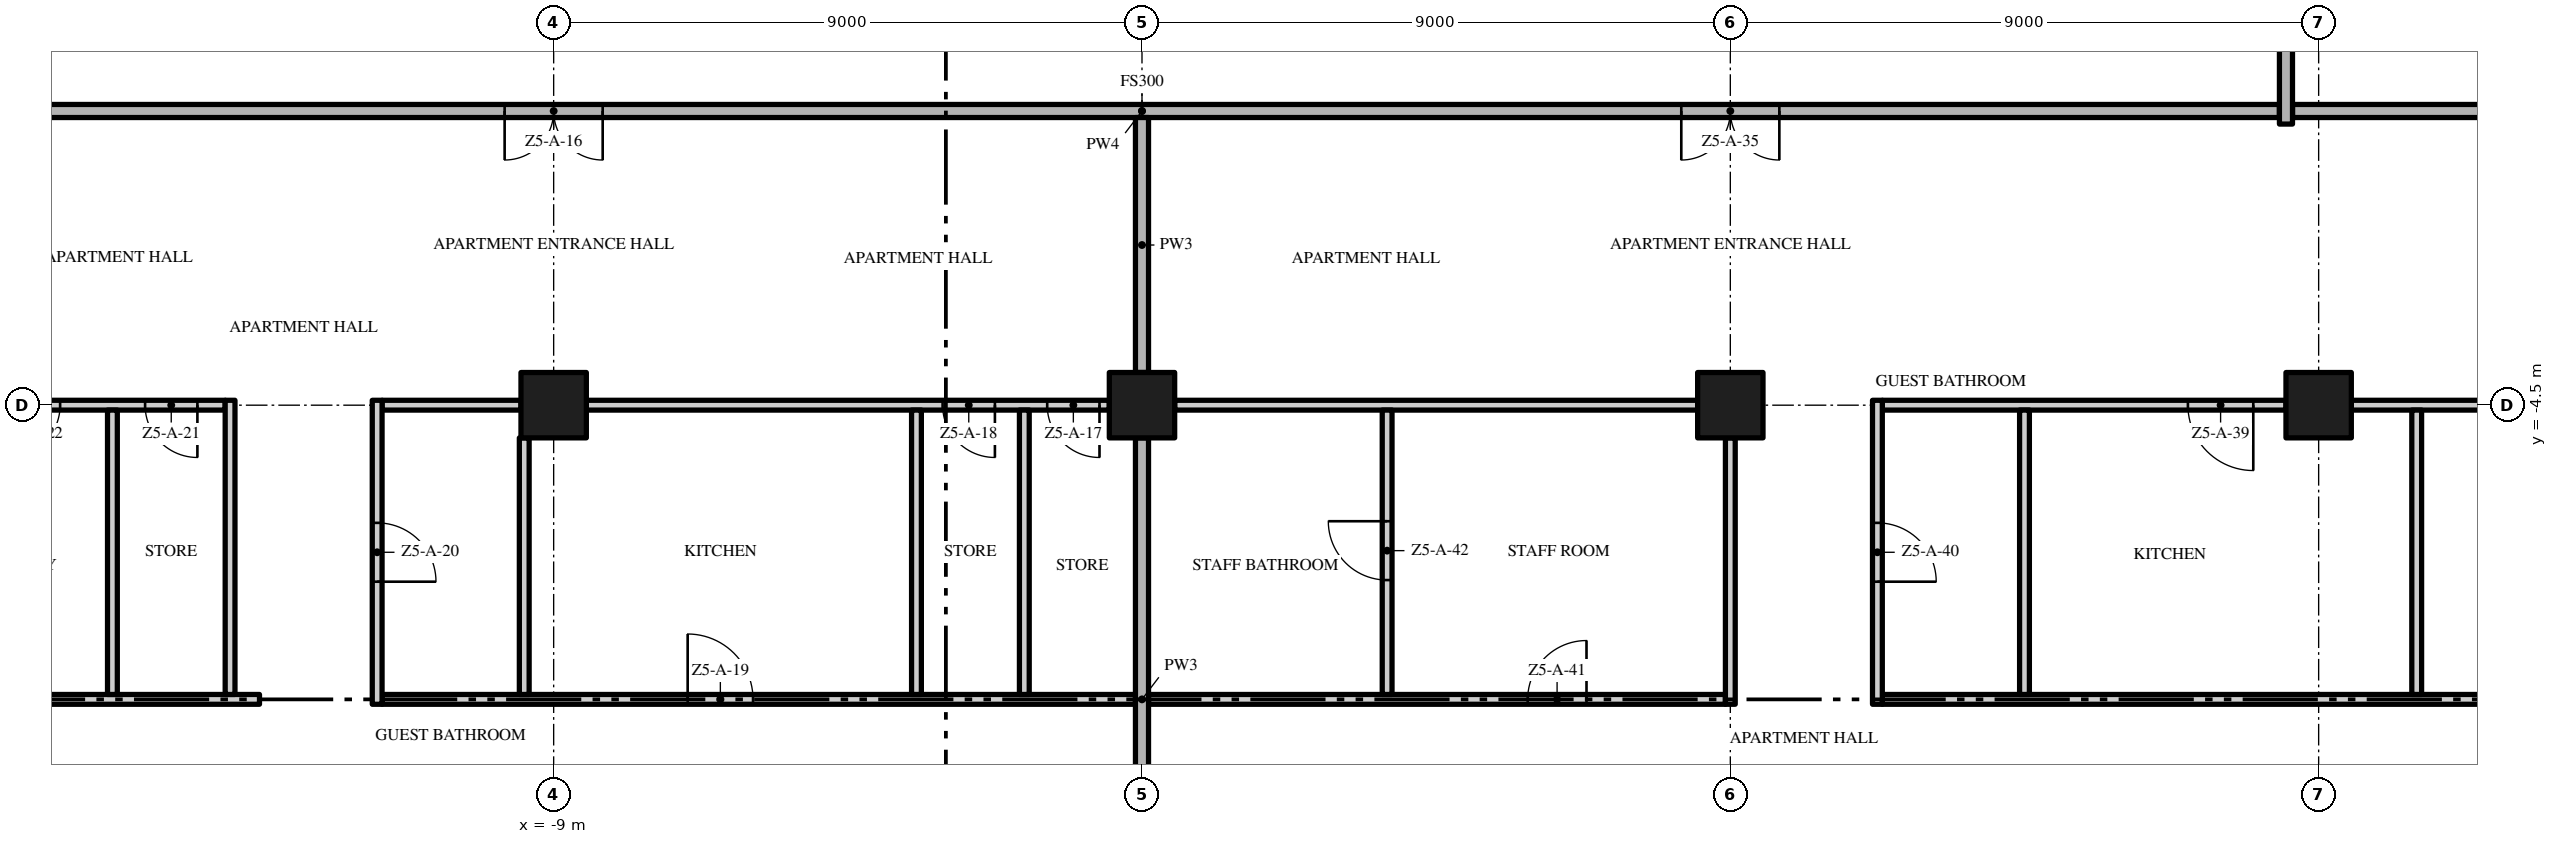
"""IFC4 building model, lengths in metres.
Left out: names, types, materials, properties, quantities, classifications, styles, units other than length and angle.
Written with IfcOpenShell. Run it as: python <this file> out.ifc"""

import sys

from ifc_helpers import new_model, si_unit, direction, frame, frame_2d, origin, origin_2d, place, context, subcontext, project, spatial, rectangle, extrude, element, fill, save


model = new_model("IFC4")
c1 = context("Model", 3, precision=1e-05, world=origin(), true_north=direction((0.0, 1.0)))
c2 = subcontext(c1, "Body", "Model", "MODEL_VIEW")
j1 = project(units=[si_unit("LENGTHUNIT", "METRE"), si_unit("PLANEANGLEUNIT", "RADIAN")], contexts=[c1])
p1 = place(None, origin())
s1 = spatial("IfcSite", under=j1, at=p1, CompositionType="ELEMENT")
p2 = place(p1, origin())
s2 = spatial("IfcBuilding", under=s1, at=p2, CompositionType="ELEMENT")
p3 = place(p2, frame((0.0, 0.0, 238.8)))
s3 = spatial("IfcBuildingStorey", under=s2, at=p3, CompositionType="ELEMENT", Elevation=238.8)
for number, where, z_axis, x_axis in (
    (1, (-9.0, -4.5, 0.0), (0.0, 0.0, 1.0), (1.0, 0.0, 0.0)),
    (2, (0.0, -4.5, 0.0), (0.0, 0.0, 1.0), (1.0, 0.0, 0.0)),
    (3, (18.0, -4.5, 0.0), (0.0, 0.0, 1.0), (1.0, 0.0, 0.0)),
    (4, (9.0, -4.5, 0.0), (0.0, 0.0, 1.0), (1.0, 0.0, 0.0)),
):
    element("IfcColumn", number, at=place(p3, frame(where, z_axis=z_axis, x_axis=x_axis)), inside=s3, PredefinedType="COLUMN", context=c2, shape_type="SweptSolid", body=[
        extrude(rectangle(XDim=1.0, YDim=1.0, at=origin_2d()), origin(), (0.0, 0.0, 1.0), 3.5),
    ])
p4 = place(p3, frame((-26.7, -9.0, 0.0), z_axis=(0.0, 0.0, 1.0), x_axis=(1.0, 0.0, 0.0)))
e5 = element("IfcWall", 5, at=p4, inside=s3, PredefinedType="PARTITIONING", context=c2, shape_type="SweptSolid", body=[
    extrude(rectangle(XDim=13.2, YDim=0.15, at=frame_2d((6.6, 0.0))), origin(), (0.0, 0.0, 1.0), 3.5),
])
p5 = place(p3, frame((-11.625, -9.0, 0.0), z_axis=(0.0, 0.0, 1.0), x_axis=(1.0, 0.0, 0.0)))
e6 = element("IfcWall", 6, at=p5, inside=s3, PredefinedType="PARTITIONING", context=c2, shape_type="SweptSolid", body=[
    extrude(rectangle(XDim=11.525, YDim=0.15, at=frame_2d((5.763, 0.0))), origin(), (0.0, 0.0, 1.0), 3.5),
])
p6 = place(p5, frame((4.675, 0.0, 0.0)))
e7 = element("IfcOpeningElement", 7, at=p6, cuts=e6, PredefinedType="OPENING", context=c2, shape_type="SweptSolid", body=[
    extrude(rectangle(XDim=1.0, YDim=2.4, at=frame_2d((0.5, 1.2))), frame((0.0, 0.085, 0.0), z_axis=(0.0, -1.0, 0.0), x_axis=(1.0, 0.0, 0.0)), (0.0, 0.0, 1.0), 0.17),
])
p7 = place(p3, frame((0.1, -9.0, 0.0), z_axis=(0.0, 0.0, 1.0), x_axis=(1.0, 0.0, 0.0)))
e8 = element("IfcWall", 8, at=p7, inside=s3, PredefinedType="PARTITIONING", context=c2, shape_type="SweptSolid", body=[
    extrude(rectangle(XDim=8.825, YDim=0.15, at=frame_2d((4.412, 0.0))), origin(), (0.0, 0.0, 1.0), 3.5),
])
p8 = place(p7, frame((5.8, 0.0, 0.0)))
e9 = element("IfcOpeningElement", 9, at=p8, cuts=e8, PredefinedType="OPENING", context=c2, shape_type="SweptSolid", body=[
    extrude(rectangle(XDim=0.9, YDim=2.1, at=frame_2d((0.45, 1.05))), frame((0.0, 0.085, 0.0), z_axis=(0.0, -1.0, 0.0), x_axis=(1.0, 0.0, 0.0)), (0.0, 0.0, 1.0), 0.17),
])
p9 = place(p3, frame((11.325, -9.0, 0.0), z_axis=(0.0, 0.0, 1.0), x_axis=(1.0, 0.0, 0.0)))
e10 = element("IfcWall", 10, at=p9, inside=s3, PredefinedType="PARTITIONING", context=c2, shape_type="SweptSolid", body=[
    extrude(rectangle(XDim=15.375, YDim=0.15, at=frame_2d((7.688, 0.0))), origin(), (0.0, 0.0, 1.0), 3.5),
])
p10 = place(p9, frame((14.375, 0.0, 0.0)))
e11 = element("IfcOpeningElement", 11, at=p10, cuts=e10, PredefinedType="OPENING", context=c2, shape_type="SweptSolid", body=[
    extrude(rectangle(XDim=0.8, YDim=2.0, at=frame_2d((0.4, 1.0))), frame((0.0, 0.085, 0.0), z_axis=(0.0, -1.0, 0.0), x_axis=(1.0, 0.0, 0.0)), (0.0, 0.0, 1.0), 0.17),
])
p11 = place(p3, frame((-14.025, -4.5, 0.0), z_axis=(0.0, 0.0, 1.0), x_axis=(-1.0, 0.0, 0.0)))
e12 = element("IfcWall", 12, at=p11, inside=s3, PredefinedType="PARTITIONING", context=c2, shape_type="SweptSolid", body=[
    extrude(rectangle(XDim=3.475, YDim=0.15, at=frame_2d((1.738, 0.0))), origin(), (0.0, 0.0, 1.0), 3.5),
])
p12 = place(p11, frame((0.425, 0.0, 0.0)))
e13 = element("IfcOpeningElement", 13, at=p12, cuts=e12, PredefinedType="OPENING", context=c2, shape_type="SweptSolid", body=[
    extrude(rectangle(XDim=0.8, YDim=2.0, at=frame_2d((0.4, 1.0))), frame((0.0, 0.085, 0.0), z_axis=(0.0, -1.0, 0.0), x_axis=(1.0, 0.0, 0.0)), (0.0, 0.0, 1.0), 0.17),
])
p13 = place(p11, frame((2.525, 0.0, 0.0)))
e14 = element("IfcOpeningElement", 14, at=p13, cuts=e12, PredefinedType="OPENING", context=c2, shape_type="SweptSolid", body=[
    extrude(rectangle(XDim=0.8, YDim=2.0, at=frame_2d((0.4, 1.0))), frame((0.0, 0.085, 0.0), z_axis=(0.0, -1.0, 0.0), x_axis=(1.0, 0.0, 0.0)), (0.0, 0.0, 1.0), 0.17),
])
p14 = place(p3, frame((-11.625, -4.5, 0.0), z_axis=(0.0, 0.0, 1.0), x_axis=(1.0, 0.0, 0.0)))
e15 = element("IfcWall", 15, at=p14, inside=s3, PredefinedType="PARTITIONING", context=c2, shape_type="SweptSolid", body=[
    extrude(rectangle(XDim=2.125, YDim=0.15, at=frame_2d((1.062, 0.0))), origin(), (0.0, 0.0, 1.0), 3.5),
])
p15 = place(p3, frame((-0.5, -4.5, 0.0), z_axis=(0.0, 0.0, 1.0), x_axis=(-1.0, 0.0, 0.0)))
e16 = element("IfcWall", 16, at=p15, inside=s3, PredefinedType="PARTITIONING", context=c2, shape_type="SweptSolid", body=[
    extrude(rectangle(XDim=8.0, YDim=0.15, at=frame_2d((4.0, 0.0))), origin(), (0.0, 0.0, 1.0), 3.5),
])
p16 = place(p15, frame((0.15, 0.0, 0.0)))
e17 = element("IfcOpeningElement", 17, at=p16, cuts=e16, PredefinedType="OPENING", context=c2, shape_type="SweptSolid", body=[
    extrude(rectangle(XDim=0.8, YDim=2.0, at=frame_2d((0.4, 1.0))), frame((0.0, 0.085, 0.0), z_axis=(0.0, -1.0, 0.0), x_axis=(1.0, 0.0, 0.0)), (0.0, 0.0, 1.0), 0.17),
])
p17 = place(p15, frame((1.75, 0.0, 0.0)))
e18 = element("IfcOpeningElement", 18, at=p17, cuts=e16, PredefinedType="OPENING", context=c2, shape_type="SweptSolid", body=[
    extrude(rectangle(XDim=0.8, YDim=2.0, at=frame_2d((0.4, 1.0))), frame((0.0, 0.085, 0.0), z_axis=(0.0, -1.0, 0.0), x_axis=(1.0, 0.0, 0.0)), (0.0, 0.0, 1.0), 0.17),
])
p18 = place(p3, frame((0.5, -4.5, 0.0), z_axis=(0.0, 0.0, 1.0), x_axis=(1.0, 0.0, 0.0)))
e19 = element("IfcWall", 19, at=p18, inside=s3, PredefinedType="PARTITIONING", context=c2, shape_type="SweptSolid", body=[
    extrude(rectangle(XDim=8.0, YDim=0.15, at=frame_2d((4.0, 0.0))), origin(), (0.0, 0.0, 1.0), 3.5),
])
p19 = place(p3, frame((17.5, -4.5, 0.0), z_axis=(0.0, 0.0, 1.0), x_axis=(-1.0, 0.0, 0.0)))
e20 = element("IfcWall", 20, at=p19, inside=s3, PredefinedType="PARTITIONING", context=c2, shape_type="SweptSolid", body=[
    extrude(rectangle(XDim=6.175, YDim=0.15, at=frame_2d((3.087, 0.0))), origin(), (0.0, 0.0, 1.0), 3.5),
])
p20 = place(p19, frame((0.5, 0.0, 0.0)))
e21 = element("IfcOpeningElement", 21, at=p20, cuts=e20, PredefinedType="OPENING", context=c2, shape_type="SweptSolid", body=[
    extrude(rectangle(XDim=1.0, YDim=2.4, at=frame_2d((0.5, 1.2))), frame((0.0, 0.085, 0.0), z_axis=(0.0, -1.0, 0.0), x_axis=(1.0, 0.0, 0.0)), (0.0, 0.0, 1.0), 0.17),
])
p21 = place(p3, frame((26.1, -4.5, 0.0), z_axis=(0.0, 0.0, 1.0), x_axis=(-1.0, 0.0, 0.0)))
e22 = element("IfcWall", 22, at=p21, inside=s3, PredefinedType="PARTITIONING", context=c2, shape_type="SweptSolid", body=[
    extrude(rectangle(XDim=7.6, YDim=0.15, at=frame_2d((3.8, 0.0))), origin(), (0.0, 0.0, 1.0), 3.5),
])
p22 = place(p21, frame((1.85, 0.0, 0.0)))
e23 = element("IfcOpeningElement", 23, at=p22, cuts=e22, PredefinedType="OPENING", context=c2, shape_type="SweptSolid", body=[
    extrude(rectangle(XDim=0.8, YDim=2.0, at=frame_2d((0.4, 1.0))), frame((0.0, 0.085, 0.0), z_axis=(0.0, -1.0, 0.0), x_axis=(1.0, 0.0, 0.0)), (0.0, 0.0, 1.0), 0.17),
])
p23 = place(p21, frame((4.7, 0.0, 0.0)))
e24 = element("IfcOpeningElement", 24, at=p23, cuts=e22, PredefinedType="OPENING", context=c2, shape_type="SweptSolid", body=[
    extrude(rectangle(XDim=0.8, YDim=2.0, at=frame_2d((0.4, 1.0))), frame((0.0, 0.085, 0.0), z_axis=(0.0, -1.0, 0.0), x_axis=(1.0, 0.0, 0.0)), (0.0, 0.0, 1.0), 0.17),
])
p24 = place(p3, frame((17.4, 0.0, 0.0), z_axis=(0.0, 0.0, 1.0), x_axis=(-1.0, 0.0, 0.0)))
e25 = element("IfcWall", 25, at=p24, inside=s3, PredefinedType="PARTITIONING", context=c2, shape_type="SweptSolid", body=[
    extrude(rectangle(XDim=34.8, YDim=0.2, at=frame_2d((17.4, 0.0))), origin(), (0.0, 0.0, 1.0), 3.5),
])
p25 = place(p24, frame((25.65, 0.0, 0.0)))
e26 = element("IfcOpeningElement", 26, at=p25, cuts=e25, PredefinedType="OPENING", context=c2, shape_type="SweptSolid", body=[
    extrude(rectangle(XDim=1.5, YDim=2.4, at=frame_2d((0.75, 1.2))), frame((0.0, 0.11, 0.0), z_axis=(0.0, -1.0, 0.0), x_axis=(1.0, 0.0, 0.0)), (0.0, 0.0, 1.0), 0.22),
])
p26 = place(p24, frame((7.65, 0.0, 0.0)))
e27 = element("IfcOpeningElement", 27, at=p26, cuts=e25, PredefinedType="OPENING", context=c2, shape_type="SweptSolid", body=[
    extrude(rectangle(XDim=1.5, YDim=2.4, at=frame_2d((0.75, 1.2))), frame((0.0, 0.11, 0.0), z_axis=(0.0, -1.0, 0.0), x_axis=(1.0, 0.0, 0.0)), (0.0, 0.0, 1.0), 0.22),
])
p27 = place(p3, frame((17.6, 0.0, 0.0), z_axis=(0.0, 0.0, 1.0), x_axis=(1.0, 0.0, 0.0)))
e28 = element("IfcWall", 28, at=p27, inside=s3, PredefinedType="PARTITIONING", context=c2, shape_type="SweptSolid", body=[
    extrude(rectangle(XDim=9.1, YDim=0.2, at=frame_2d((4.55, 0.0))), origin(), (0.0, 0.0, 1.0), 3.5),
])
p28 = place(p3, frame((-15.75, -8.925, 0.0), z_axis=(0.0, 0.0, 1.0), x_axis=(0.0, 1.0, 0.0)))
e29 = element("IfcWall", 29, at=p28, inside=s3, PredefinedType="PARTITIONING", context=c2, shape_type="SweptSolid", body=[
    extrude(rectangle(XDim=4.35, YDim=0.15, at=frame_2d((2.175, 0.0))), origin(), (0.0, 0.0, 1.0), 3.5),
])
p29 = place(p3, frame((-13.95, -8.925, 0.0), z_axis=(0.0, 0.0, 1.0), x_axis=(0.0, 1.0, 0.0)))
e30 = element("IfcWall", 30, at=p29, inside=s3, PredefinedType="PARTITIONING", context=c2, shape_type="SweptSolid", body=[
    extrude(rectangle(XDim=4.5, YDim=0.15, at=frame_2d((2.25, 0.0))), origin(), (0.0, 0.0, 1.0), 3.5),
])
p30 = place(p3, frame((-11.7, -4.425, 0.0), z_axis=(0.0, 0.0, 1.0), x_axis=(0.0, -1.0, 0.0)))
e31 = element("IfcWall", 31, at=p30, inside=s3, PredefinedType="PARTITIONING", context=c2, shape_type="SweptSolid", body=[
    extrude(rectangle(XDim=4.65, YDim=0.15, at=frame_2d((2.325, 0.0))), origin(), (0.0, 0.0, 1.0), 3.5),
])
p31 = place(p30, frame((1.875, 0.0, 0.0)))
e32 = element("IfcOpeningElement", 32, at=p31, cuts=e31, PredefinedType="OPENING", context=c2, shape_type="SweptSolid", body=[
    extrude(rectangle(XDim=0.9, YDim=2.1, at=frame_2d((0.45, 1.05))), frame((0.0, 0.085, 0.0), z_axis=(0.0, -1.0, 0.0), x_axis=(1.0, 0.0, 0.0)), (0.0, 0.0, 1.0), 0.17),
])
p32 = place(p3, frame((-9.45, -8.925, 0.0), z_axis=(0.0, 0.0, 1.0), x_axis=(0.0, 1.0, 0.0)))
e33 = element("IfcWall", 33, at=p32, inside=s3, PredefinedType="PARTITIONING", context=c2, shape_type="SweptSolid", body=[
    extrude(rectangle(XDim=3.925, YDim=0.15, at=frame_2d((1.962, 0.0))), origin(), (0.0, 0.0, 1.0), 3.5),
])
for number, where, z_axis, x_axis in (
    (34, (-3.45, -8.925, 0.0), (0.0, 0.0, 1.0), (0.0, 1.0, 0.0)),
    (35, (-1.8, -8.925, 0.0), (0.0, 0.0, 1.0), (0.0, 1.0, 0.0)),
):
    element("IfcWall", number, at=place(p3, frame(where, z_axis=z_axis, x_axis=x_axis)), inside=s3, PredefinedType="PARTITIONING", context=c2, shape_type="SweptSolid", body=[
        extrude(rectangle(XDim=4.35, YDim=0.15, at=frame_2d((2.175, 0.0))), origin(), (0.0, 0.0, 1.0), 3.5),
    ])
p33 = place(p3, frame((0.0, -13.0, 0.0), z_axis=(0.0, 0.0, 1.0), x_axis=(0.0, 1.0, 0.0)))
e36 = element("IfcWall", 36, at=p33, inside=s3, PredefinedType="PARTITIONING", context=c2, shape_type="SweptSolid", body=[
    extrude(rectangle(XDim=8.0, YDim=0.2, at=frame_2d((4.0, 0.0))), origin(), (0.0, 0.0, 1.0), 3.5),
])
p34 = place(p3, frame((0.0, -4.0, 0.0), z_axis=(0.0, 0.0, 1.0), x_axis=(0.0, 1.0, 0.0)))
e37 = element("IfcWall", 37, at=p34, inside=s3, PredefinedType="PARTITIONING", context=c2, shape_type="SweptSolid", body=[
    extrude(rectangle(XDim=3.9, YDim=0.2, at=frame_2d((1.95, 0.0))), origin(), (0.0, 0.0, 1.0), 3.5),
])
p35 = place(p3, frame((3.75, -8.925, 0.0), z_axis=(0.0, 0.0, 1.0), x_axis=(0.0, 1.0, 0.0)))
e38 = element("IfcWall", 38, at=p35, inside=s3, PredefinedType="PARTITIONING", context=c2, shape_type="SweptSolid", body=[
    extrude(rectangle(XDim=4.35, YDim=0.15, at=frame_2d((2.175, 0.0))), origin(), (0.0, 0.0, 1.0), 3.5),
])
p36 = place(p35, frame((1.75, 0.0, 0.0)))
e39 = element("IfcOpeningElement", 39, at=p36, cuts=e38, PredefinedType="OPENING", context=c2, shape_type="SweptSolid", body=[
    extrude(rectangle(XDim=0.9, YDim=2.1, at=frame_2d((0.45, 1.05))), frame((0.0, 0.085, 0.0), z_axis=(0.0, -1.0, 0.0), x_axis=(1.0, 0.0, 0.0)), (0.0, 0.0, 1.0), 0.17),
])
p37 = place(p3, frame((9.0, -9.075, 0.0), z_axis=(0.0, 0.0, 1.0), x_axis=(0.0, 1.0, 0.0)))
e40 = element("IfcWall", 40, at=p37, inside=s3, PredefinedType="PARTITIONING", context=c2, shape_type="SweptSolid", body=[
    extrude(rectangle(XDim=4.075, YDim=0.15, at=frame_2d((2.038, 0.0))), origin(), (0.0, 0.0, 1.0), 3.5),
])
p38 = place(p3, frame((11.25, -4.425, 0.0), z_axis=(0.0, 0.0, 1.0), x_axis=(0.0, -1.0, 0.0)))
e41 = element("IfcWall", 41, at=p38, inside=s3, PredefinedType="PARTITIONING", context=c2, shape_type="SweptSolid", body=[
    extrude(rectangle(XDim=4.65, YDim=0.15, at=frame_2d((2.325, 0.0))), origin(), (0.0, 0.0, 1.0), 3.5),
])
p39 = place(p38, frame((1.875, 0.0, 0.0)))
e42 = element("IfcOpeningElement", 42, at=p39, cuts=e41, PredefinedType="OPENING", context=c2, shape_type="SweptSolid", body=[
    extrude(rectangle(XDim=0.9, YDim=2.1, at=frame_2d((0.45, 1.05))), frame((0.0, 0.085, 0.0), z_axis=(0.0, -1.0, 0.0), x_axis=(1.0, 0.0, 0.0)), (0.0, 0.0, 1.0), 0.17),
])
p40 = place(p3, frame((13.5, -8.925, 0.0), z_axis=(0.0, 0.0, 1.0), x_axis=(0.0, 1.0, 0.0)))
e43 = element("IfcWall", 43, at=p40, inside=s3, PredefinedType="PARTITIONING", context=c2, shape_type="SweptSolid", body=[
    extrude(rectangle(XDim=4.35, YDim=0.15, at=frame_2d((2.175, 0.0))), origin(), (0.0, 0.0, 1.0), 3.5),
])
p41 = place(p3, frame((17.5, -0.2, 0.0), z_axis=(0.0, 0.0, 1.0), x_axis=(0.0, 1.0, 0.0)))
e44 = element("IfcWall", 44, at=p41, inside=s3, PredefinedType="PARTITIONING", context=c2, shape_type="SweptSolid", body=[
    extrude(rectangle(XDim=4.2, YDim=0.2, at=frame_2d((2.1, 0.0))), origin(), (0.0, 0.0, 1.0), 3.5),
])
p42 = place(p3, frame((19.5, -8.925, 0.0), z_axis=(0.0, 0.0, 1.0), x_axis=(0.0, 1.0, 0.0)))
e45 = element("IfcWall", 45, at=p42, inside=s3, PredefinedType="PARTITIONING", context=c2, shape_type="SweptSolid", body=[
    extrude(rectangle(XDim=4.35, YDim=0.15, at=frame_2d((2.175, 0.0))), origin(), (0.0, 0.0, 1.0), 3.5),
])
p43 = place(p25, origin())
e46 = element("IfcDoor", 46, at=p43, inside=s3, OperationType="DOUBLE_DOOR_SINGLE_SWING", PredefinedType="DOOR", context=c2, shape_type="SweptSolid", body=[
    extrude(rectangle(XDim=1.5, YDim=2.4, at=frame_2d((0.75, 1.2))), frame((0.0, 0.025, 0.0), z_axis=(0.0, -1.0, 0.0), x_axis=(1.0, 0.0, 0.0)), (0.0, 0.0, 1.0), 0.05),
])
fill(e26, e46)
p44 = place(p16, origin())
e47 = element("IfcDoor", 47, at=p44, inside=s3, OperationType="SINGLE_SWING_LEFT", PredefinedType="DOOR", context=c2, shape_type="SweptSolid", body=[
    extrude(rectangle(XDim=0.8, YDim=2.0, at=frame_2d((0.4, 1.0))), frame((0.0, 0.025, 0.0), z_axis=(0.0, -1.0, 0.0), x_axis=(1.0, 0.0, 0.0)), (0.0, 0.0, 1.0), 0.05),
])
fill(e17, e47)
p45 = place(p17, origin())
e48 = element("IfcDoor", 48, at=p45, inside=s3, OperationType="SINGLE_SWING_LEFT", PredefinedType="DOOR", context=c2, shape_type="SweptSolid", body=[
    extrude(rectangle(XDim=0.8, YDim=2.0, at=frame_2d((0.4, 1.0))), frame((0.0, 0.025, 0.0), z_axis=(0.0, -1.0, 0.0), x_axis=(1.0, 0.0, 0.0)), (0.0, 0.0, 1.0), 0.05),
])
fill(e18, e48)
p46 = place(p6, origin())
e49 = element("IfcDoor", 49, at=p46, inside=s3, OperationType="SINGLE_SWING_LEFT", PredefinedType="DOOR", context=c2, shape_type="SweptSolid", body=[
    extrude(rectangle(XDim=1.0, YDim=2.4, at=frame_2d((0.5, 1.2))), frame((0.0, 0.025, 0.0), z_axis=(0.0, -1.0, 0.0), x_axis=(1.0, 0.0, 0.0)), (0.0, 0.0, 1.0), 0.05),
])
fill(e7, e49)
p47 = place(p31, origin())
e50 = element("IfcDoor", 50, at=p47, inside=s3, OperationType="SINGLE_SWING_RIGHT", PredefinedType="DOOR", context=c2, shape_type="SweptSolid", body=[
    extrude(rectangle(XDim=0.9, YDim=2.1, at=frame_2d((0.45, 1.05))), frame((0.0, 0.025, 0.0), z_axis=(0.0, -1.0, 0.0), x_axis=(1.0, 0.0, 0.0)), (0.0, 0.0, 1.0), 0.05),
])
fill(e32, e50)
p48 = place(p12, origin())
e51 = element("IfcDoor", 51, at=p48, inside=s3, OperationType="SINGLE_SWING_LEFT", PredefinedType="DOOR", context=c2, shape_type="SweptSolid", body=[
    extrude(rectangle(XDim=0.8, YDim=2.0, at=frame_2d((0.4, 1.0))), frame((0.0, 0.025, 0.0), z_axis=(0.0, -1.0, 0.0), x_axis=(1.0, 0.0, 0.0)), (0.0, 0.0, 1.0), 0.05),
])
fill(e13, e51)
p49 = place(p13, origin())
e52 = element("IfcDoor", 52, at=p49, inside=s3, OperationType="SINGLE_SWING_RIGHT", PredefinedType="DOOR", context=c2, shape_type="SweptSolid", body=[
    extrude(rectangle(XDim=0.8, YDim=2.0, at=frame_2d((0.4, 1.0))), frame((0.0, 0.025, 0.0), z_axis=(0.0, -1.0, 0.0), x_axis=(1.0, 0.0, 0.0)), (0.0, 0.0, 1.0), 0.05),
])
fill(e14, e52)
p50 = place(p26, origin())
e53 = element("IfcDoor", 53, at=p50, inside=s3, OperationType="DOUBLE_DOOR_SINGLE_SWING", PredefinedType="DOOR", context=c2, shape_type="SweptSolid", body=[
    extrude(rectangle(XDim=1.5, YDim=2.4, at=frame_2d((0.75, 1.2))), frame((0.0, 0.025, 0.0), z_axis=(0.0, -1.0, 0.0), x_axis=(1.0, 0.0, 0.0)), (0.0, 0.0, 1.0), 0.05),
])
fill(e27, e53)
p51 = place(p20, origin())
e54 = element("IfcDoor", 54, at=p51, inside=s3, OperationType="SINGLE_SWING_LEFT", PredefinedType="DOOR", context=c2, shape_type="SweptSolid", body=[
    extrude(rectangle(XDim=1.0, YDim=2.4, at=frame_2d((0.5, 1.2))), frame((0.0, 0.025, 0.0), z_axis=(0.0, -1.0, 0.0), x_axis=(1.0, 0.0, 0.0)), (0.0, 0.0, 1.0), 0.05),
])
fill(e21, e54)
p52 = place(p39, origin())
e55 = element("IfcDoor", 55, at=p52, inside=s3, OperationType="SINGLE_SWING_RIGHT", PredefinedType="DOOR", context=c2, shape_type="SweptSolid", body=[
    extrude(rectangle(XDim=0.9, YDim=2.1, at=frame_2d((0.45, 1.05))), frame((0.0, 0.025, 0.0), z_axis=(0.0, -1.0, 0.0), x_axis=(1.0, 0.0, 0.0)), (0.0, 0.0, 1.0), 0.05),
])
fill(e42, e55)
p53 = place(p8, origin())
e56 = element("IfcDoor", 56, at=p53, inside=s3, OperationType="SINGLE_SWING_RIGHT", PredefinedType="DOOR", context=c2, shape_type="SweptSolid", body=[
    extrude(rectangle(XDim=0.9, YDim=2.1, at=frame_2d((0.45, 1.05))), frame((0.0, 0.025, 0.0), z_axis=(0.0, -1.0, 0.0), x_axis=(1.0, 0.0, 0.0)), (0.0, 0.0, 1.0), 0.05),
])
fill(e9, e56)
p54 = place(p36, origin())
e57 = element("IfcDoor", 57, at=p54, inside=s3, OperationType="SINGLE_SWING_RIGHT", PredefinedType="DOOR", context=c2, shape_type="SweptSolid", body=[
    extrude(rectangle(XDim=0.9, YDim=2.1, at=frame_2d((0.45, 1.05))), frame((0.0, 0.025, 0.0), z_axis=(0.0, -1.0, 0.0), x_axis=(1.0, 0.0, 0.0)), (0.0, 0.0, 1.0), 0.05),
])
fill(e39, e57)
save(model, sys.argv[1])
